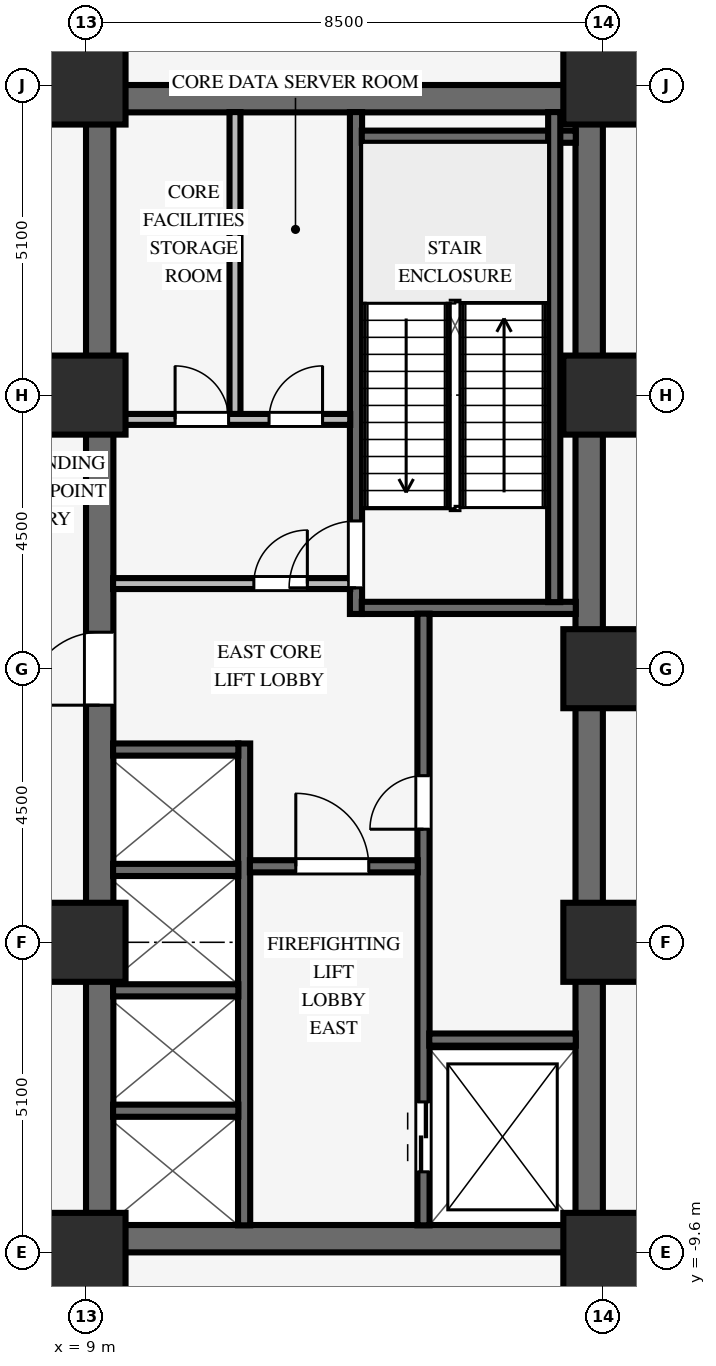
"""IFC4 building model, lengths in metres.
Left out: names, types, materials, properties, quantities, classifications, styles, units other than length and angle.
Written with IfcOpenShell. Run it as: python <this file> out.ifc"""

import sys

from ifc_helpers import new_model, si_unit, direction, frame, frame_2d, origin, origin_2d, place, context, subcontext, project, spatial, rectangle, extrude, source, transform, mapped, element, fill, save


model = new_model("IFC4")
c1 = context("Model", 3, precision=1e-05, world=origin(), true_north=direction((0.0, 1.0)))
c2 = subcontext(c1, "Body", "Model", "MODEL_VIEW")
j1 = project(units=[si_unit("LENGTHUNIT", "METRE"), si_unit("PLANEANGLEUNIT", "RADIAN")], contexts=[c1])
p1 = place(None, origin())
s1 = spatial("IfcSite", under=j1, at=p1, CompositionType="ELEMENT")
p2 = place(p1, origin())
s2 = spatial("IfcBuilding", under=s1, at=p2, CompositionType="ELEMENT")
p3 = place(p2, frame((0.0, 0.0, 23.0)))
s3 = spatial("IfcBuildingStorey", under=s2, at=p3, CompositionType="ELEMENT", Elevation=23.0)
for number, where, z_axis, x_axis in (
    (1, (9.0, -9.375, 0.0), (0.0, 0.0, 1.0), (1.0, 0.0, 0.0)),
    (2, (9.0, 9.375, 0.0), (0.0, 0.0, 1.0), (1.0, 0.0, 0.0)),
):
    element("IfcWall", number, at=place(p3, frame(where, z_axis=z_axis, x_axis=x_axis)), inside=s3, PredefinedType="SHEAR", context=c2, shape_type="SweptSolid", body=[
        extrude(rectangle(XDim=8.5, YDim=0.45, at=frame_2d((4.25, 0.0))), origin(), (0.0, 0.0, 1.0), 4.2),
    ])
p4 = place(p3, frame((9.225, -9.155, 0.0), z_axis=(0.0, 0.0, 1.0), x_axis=(0.0, 1.0, 0.0)))
e3 = element("IfcWall", 3, at=p4, inside=s3, PredefinedType="SHEAR", context=c2, shape_type="SweptSolid", body=[
    extrude(rectangle(XDim=18.31, YDim=0.45, at=frame_2d((9.155, 0.0))), origin(), (0.0, 0.0, 1.0), 4.2),
])
p5 = place(p4, frame((8.555, 0.0, 0.0)))
e4 = element("IfcOpeningElement", 4, at=p5, cuts=e3, PredefinedType="OPENING", context=c2, shape_type="SweptSolid", body=[
    extrude(rectangle(XDim=1.2, YDim=2.15, at=frame_2d((0.6, 1.075))), frame((0.0, 0.235, 0.0), z_axis=(0.0, -1.0, 0.0), x_axis=(1.0, 0.0, 0.0)), (0.0, 0.0, 1.0), 0.47),
])
p6 = place(p3, frame((17.275, -9.155, 0.0), z_axis=(0.0, 0.0, 1.0), x_axis=(0.0, 1.0, 0.0)))
e5 = element("IfcWall", 5, at=p6, inside=s3, PredefinedType="SHEAR", context=c2, shape_type="SweptSolid", body=[
    extrude(rectangle(XDim=18.31, YDim=0.45, at=frame_2d((9.155, 0.0))), origin(), (0.0, 0.0, 1.0), 4.2),
])
for number, where, z_axis, x_axis in (
    (6, (9.0, -9.6, 0.0), (0.0, 0.0, 1.0), (1.0, 0.0, 0.0)),
    (7, (9.0, -4.5, 0.0), (0.0, 0.0, 1.0), (1.0, 0.0, 0.0)),
    (8, (9.0, 4.5, 0.0), (0.0, 0.0, 1.0), (1.0, 0.0, 0.0)),
    (9, (9.0, 9.6, 0.0), (0.0, 0.0, 1.0), (1.0, 0.0, 0.0)),
    (10, (17.5, -9.6, 0.0), (0.0, 0.0, 1.0), (1.0, 0.0, 0.0)),
    (11, (17.5, -4.5, 0.0), (0.0, 0.0, 1.0), (1.0, 0.0, 0.0)),
    (12, (17.5, 4.5, 0.0), (0.0, 0.0, 1.0), (1.0, 0.0, 0.0)),
    (13, (17.5, 9.6, 0.0), (0.0, 0.0, 1.0), (1.0, 0.0, 0.0)),
    (14, (17.5, 0.0, 0.0), (0.0, 0.0, 1.0), (1.0, 0.0, 0.0)),
):
    element("IfcColumn", number, at=place(p3, frame(where, z_axis=z_axis, x_axis=x_axis)), inside=s3, PredefinedType="COLUMN", context=c2, shape_type="SweptSolid", body=[
        extrude(rectangle(XDim=1.3, YDim=1.3, at=origin_2d()), origin(), (0.0, 0.0, 1.0), 4.2),
    ])
p7 = place(p3, frame((13.44, 0.9, 0.0), z_axis=(0.0, 0.0, 1.0), x_axis=(0.0, 1.0, 0.0)))
e15 = element("IfcWall", 15, at=p7, inside=s3, PredefinedType="SHEAR", context=c2, shape_type="SweptSolid", body=[
    extrude(rectangle(XDim=8.255, YDim=0.2, at=frame_2d((4.127, 0.0))), origin(), (0.0, 0.0, 1.0), 4.2),
])
p8 = place(p7, frame((0.43, 0.0, 0.0)))
e16 = element("IfcOpeningElement", 16, at=p8, cuts=e15, PredefinedType="OPENING", context=c2, shape_type="SweptSolid", body=[
    extrude(rectangle(XDim=1.1, YDim=2.15, at=frame_2d((0.55, 1.075))), frame((0.0, 0.11, 0.0), z_axis=(0.0, -1.0, 0.0), x_axis=(1.0, 0.0, 0.0)), (0.0, 0.0, 1.0), 0.22),
])
for number, where, z_axis, x_axis in (
    (17, (13.535, 1.0, 0.0), (0.0, 0.0, 1.0), (1.0, 0.0, 0.0)),
    (18, (13.535, 8.75, 0.0), (0.0, 0.0, 1.0), (1.0, 0.0, 0.0)),
):
    element("IfcWall", number, at=place(p3, frame(where, z_axis=z_axis, x_axis=x_axis)), inside=s3, PredefinedType="SHEAR", context=c2, shape_type="SweptSolid", body=[
        extrude(rectangle(XDim=3.52, YDim=0.2, at=frame_2d((1.76, 0.0))), origin(), (0.0, 0.0, 1.0), 4.2),
    ])
p9 = place(p3, frame((16.7, 1.095, 0.0), z_axis=(0.0, 0.0, 1.0), x_axis=(0.0, 1.0, 0.0)))
e19 = element("IfcWall", 19, at=p9, inside=s3, PredefinedType="SHEAR", context=c2, shape_type="SweptSolid", body=[
    extrude(rectangle(XDim=8.06, YDim=0.2, at=frame_2d((4.03, 0.0))), origin(), (0.0, 0.0, 1.0), 4.2),
])
p10 = place(p3, frame((14.55, -9.155, 0.0), z_axis=(0.0, 0.0, 1.0), x_axis=(0.0, 1.0, 0.0)))
e20 = element("IfcWall", 20, at=p10, inside=s3, PredefinedType="SHEAR", context=c2, shape_type="SweptSolid", body=[
    extrude(rectangle(XDim=10.06, YDim=0.2, at=frame_2d((5.03, 0.0))), origin(), (0.0, 0.0, 1.0), 4.2),
])
p11 = place(p10, frame((6.515, 0.0, 0.0)))
e21 = element("IfcOpeningElement", 21, at=p11, cuts=e20, PredefinedType="OPENING", context=c2, shape_type="SweptSolid", body=[
    extrude(rectangle(XDim=0.88, YDim=2.1, at=frame_2d((0.44, 1.05))), frame((0.0, 0.11, 0.0), z_axis=(0.0, -1.0, 0.0), x_axis=(1.0, 0.0, 0.0)), (0.0, 0.0, 1.0), 0.22),
])
p12 = place(p10, frame((0.88, 0.0, 0.0)))
e22 = element("IfcOpeningElement", 22, at=p12, cuts=e20, PredefinedType="OPENING", context=c2, shape_type="SweptSolid", body=[
    extrude(rectangle(XDim=1.15, YDim=2.15, at=frame_2d((0.575, 1.075))), frame((0.0, 0.11, 0.0), z_axis=(0.0, -1.0, 0.0), x_axis=(1.0, 0.0, 0.0)), (0.0, 0.0, 1.0), 0.22),
])
p13 = place(p3, frame((14.645, -6.1, 0.0), z_axis=(0.0, 0.0, 1.0), x_axis=(1.0, 0.0, 0.0)))
e23 = element("IfcWall", 23, at=p13, inside=s3, PredefinedType="SHEAR", context=c2, shape_type="SweptSolid", body=[
    extrude(rectangle(XDim=2.41, YDim=0.2, at=frame_2d((1.205, 0.0))), origin(), (0.0, 0.0, 1.0), 4.2),
])
p14 = place(p3, frame((11.6, -9.155, 0.0), z_axis=(0.0, 0.0, 1.0), x_axis=(0.0, 1.0, 0.0)))
e24 = element("IfcWall", 24, at=p14, inside=s3, PredefinedType="SHEAR", context=c2, shape_type="SweptSolid", body=[
    extrude(rectangle(XDim=7.925, YDim=0.2, at=frame_2d((3.962, 0.0))), origin(), (0.0, 0.0, 1.0), 4.2),
])
p15 = place(p3, frame((11.695, -3.25, 0.0), z_axis=(0.0, 0.0, 1.0), x_axis=(1.0, 0.0, 0.0)))
e25 = element("IfcWall", 25, at=p15, inside=s3, PredefinedType="SHEAR", context=c2, shape_type="SweptSolid", body=[
    extrude(rectangle(XDim=2.76, YDim=0.2, at=frame_2d((1.38, 0.0))), origin(), (0.0, 0.0, 1.0), 4.2),
])
p16 = place(p15, frame((0.755, 0.0, 0.0)))
e26 = element("IfcOpeningElement", 26, at=p16, cuts=e25, PredefinedType="OPENING", context=c2, shape_type="SweptSolid", body=[
    extrude(rectangle(XDim=1.2, YDim=2.15, at=frame_2d((0.6, 1.075))), frame((0.0, 0.11, 0.0), z_axis=(0.0, -1.0, 0.0), x_axis=(1.0, 0.0, 0.0)), (0.0, 0.0, 1.0), 0.22),
])
for number, where, z_axis, x_axis in (
    (27, (9.445, -7.27, 0.0), (0.0, 0.0, 1.0), (1.0, 0.0, 0.0)),
    (28, (9.445, -5.29, 0.0), (0.0, 0.0, 1.0), (1.0, 0.0, 0.0)),
    (29, (9.445, -3.31, 0.0), (0.0, 0.0, 1.0), (1.0, 0.0, 0.0)),
    (30, (9.445, -1.33, 0.0), (0.0, 0.0, 1.0), (1.0, 0.0, 0.0)),
):
    element("IfcWall", number, at=place(p3, frame(where, z_axis=z_axis, x_axis=x_axis)), inside=s3, PredefinedType="SHEAR", context=c2, shape_type="SweptSolid", body=[
        extrude(rectangle(XDim=2.06, YDim=0.2, at=frame_2d((1.03, 0.0))), origin(), (0.0, 0.0, 1.0), 4.2),
    ])
p17 = place(p3, frame((9.445, 1.4, 0.0), z_axis=(0.0, 0.0, 1.0), x_axis=(1.0, 0.0, 0.0)))
e31 = element("IfcWall", 31, at=p17, inside=s3, PredefinedType="PARTITIONING", context=c2, shape_type="SweptSolid", body=[
    extrude(rectangle(XDim=3.9, YDim=0.18, at=frame_2d((1.95, 0.0))), origin(), (0.0, 0.0, 1.0), 4.19),
])
p18 = place(p17, frame((2.315, 0.0, 0.0)))
e32 = element("IfcOpeningElement", 32, at=p18, cuts=e31, PredefinedType="OPENING", context=c2, shape_type="SweptSolid", body=[
    extrude(rectangle(XDim=0.88, YDim=2.1, at=frame_2d((0.44, 1.05))), frame((0.0, 0.1, 0.0), z_axis=(0.0, -1.0, 0.0), x_axis=(1.0, 0.0, 0.0)), (0.0, 0.0, 1.0), 0.2),
])
p19 = place(p3, frame((9.445, 4.1, 0.0), z_axis=(0.0, 0.0, 1.0), x_axis=(1.0, 0.0, 0.0)))
e33 = element("IfcWall", 33, at=p19, inside=s3, PredefinedType="PARTITIONING", context=c2, shape_type="SweptSolid", body=[
    extrude(rectangle(XDim=3.9, YDim=0.18, at=frame_2d((1.95, 0.0))), origin(), (0.0, 0.0, 1.0), 4.19),
])
p20 = place(p19, frame((1.02, 0.0, 0.0)))
e34 = element("IfcOpeningElement", 34, at=p20, cuts=e33, PredefinedType="OPENING", context=c2, shape_type="SweptSolid", body=[
    extrude(rectangle(XDim=0.88, YDim=2.1, at=frame_2d((0.44, 1.05))), frame((0.0, 0.1, 0.0), z_axis=(0.0, -1.0, 0.0), x_axis=(1.0, 0.0, 0.0)), (0.0, 0.0, 1.0), 0.2),
])
p21 = place(p19, frame((2.565, 0.0, 0.0)))
e35 = element("IfcOpeningElement", 35, at=p21, cuts=e33, PredefinedType="OPENING", context=c2, shape_type="SweptSolid", body=[
    extrude(rectangle(XDim=0.88, YDim=2.1, at=frame_2d((0.44, 1.05))), frame((0.0, 0.1, 0.0), z_axis=(0.0, -1.0, 0.0), x_axis=(1.0, 0.0, 0.0)), (0.0, 0.0, 1.0), 0.2),
])
p22 = place(p3, frame((11.45, 4.19, 0.0), z_axis=(0.0, 0.0, 1.0), x_axis=(0.0, 1.0, 0.0)))
e36 = element("IfcWall", 36, at=p22, inside=s3, PredefinedType="PARTITIONING", context=c2, shape_type="SweptSolid", body=[
    extrude(rectangle(XDim=4.965, YDim=0.18, at=frame_2d((2.482, 0.0))), origin(), (0.0, 0.0, 1.0), 4.19),
])
m1 = source(origin(), c2, "Body", "SweptSolid", [
    extrude(rectangle(XDim=1.1, YDim=2.15, at=frame_2d((0.55, 1.075))), frame((0.0, 0.025, 0.0), z_axis=(0.0, -1.0, 0.0), x_axis=(1.0, 0.0, 0.0)), (0.0, 0.0, 1.0), 0.05),
])
p23 = place(p8, origin())
e37 = element("IfcDoor", 37, at=p23, inside=s3, OperationType="SINGLE_SWING_LEFT", PredefinedType="DOOR", context=c2, shape_type="MappedRepresentation", body=[
    mapped(m1, transform((0.0, 0.0, 0.0), scale=1.0)),
])
fill(e16, e37)
m2 = source(origin(), c2, "Body", "SweptSolid", [
    extrude(rectangle(XDim=0.88, YDim=2.1, at=frame_2d((0.44, 1.05))), frame((0.0, 0.025, 0.0), z_axis=(0.0, -1.0, 0.0), x_axis=(1.0, 0.0, 0.0)), (0.0, 0.0, 1.0), 0.05),
])
p24 = place(p11, origin())
e38 = element("IfcDoor", 38, at=p24, inside=s3, OperationType="SINGLE_SWING_LEFT", PredefinedType="DOOR", context=c2, shape_type="MappedRepresentation", body=[
    mapped(m2, transform((0.0, 0.0, 0.0), scale=1.0)),
])
fill(e21, e38)
m3 = source(origin(), c2, "Body", "SweptSolid", [
    extrude(rectangle(XDim=1.2, YDim=2.15, at=frame_2d((0.6, 1.075))), frame((0.0, 0.025, 0.0), z_axis=(0.0, -1.0, 0.0), x_axis=(1.0, 0.0, 0.0)), (0.0, 0.0, 1.0), 0.05),
])
p25 = place(p16, origin())
e39 = element("IfcDoor", 39, at=p25, inside=s3, OperationType="SINGLE_SWING_LEFT", PredefinedType="DOOR", context=c2, shape_type="MappedRepresentation", body=[
    mapped(m3, transform((0.0, 0.0, 0.0), scale=1.0)),
])
fill(e26, e39)
p26 = place(p5, origin())
e40 = element("IfcDoor", 40, at=p26, inside=s3, OperationType="SINGLE_SWING_LEFT", PredefinedType="DOOR", context=c2, shape_type="MappedRepresentation", body=[
    mapped(m3, transform((0.0, 0.0, 0.0), scale=1.0)),
])
fill(e4, e40)
p27 = place(p18, origin())
e41 = element("IfcDoor", 41, at=p27, inside=s3, OperationType="SINGLE_SWING_RIGHT", PredefinedType="DOOR", context=c2, shape_type="MappedRepresentation", body=[
    mapped(m2, transform((0.0, 0.0, 0.0), scale=1.0)),
])
fill(e32, e41)
p28 = place(p20, origin())
e42 = element("IfcDoor", 42, at=p28, inside=s3, OperationType="SINGLE_SWING_LEFT", PredefinedType="DOOR", context=c2, shape_type="MappedRepresentation", body=[
    mapped(m2, transform((0.0, 0.0, 0.0), scale=1.0)),
])
fill(e34, e42)
p29 = place(p21, origin())
e43 = element("IfcDoor", 43, at=p29, inside=s3, OperationType="SINGLE_SWING_RIGHT", PredefinedType="DOOR", context=c2, shape_type="MappedRepresentation", body=[
    mapped(m2, transform((0.0, 0.0, 0.0), scale=1.0)),
])
fill(e35, e43)
m4 = source(origin(), c2, "Body", "SweptSolid", [
    extrude(rectangle(XDim=1.15, YDim=2.15, at=frame_2d((0.575, 1.075))), frame((0.0, 0.025, 0.0), z_axis=(0.0, -1.0, 0.0), x_axis=(1.0, 0.0, 0.0)), (0.0, 0.0, 1.0), 0.05),
])
p30 = place(p12, origin())
e44 = element("IfcDoor", 44, at=p30, inside=s3, OperationType="DOUBLE_DOOR_SLIDING", PredefinedType="DOOR", context=c2, shape_type="MappedRepresentation", body=[
    mapped(m4, transform((0.0, 0.0, 0.0), scale=1.0)),
])
fill(e22, e44)
save(model, sys.argv[1])
